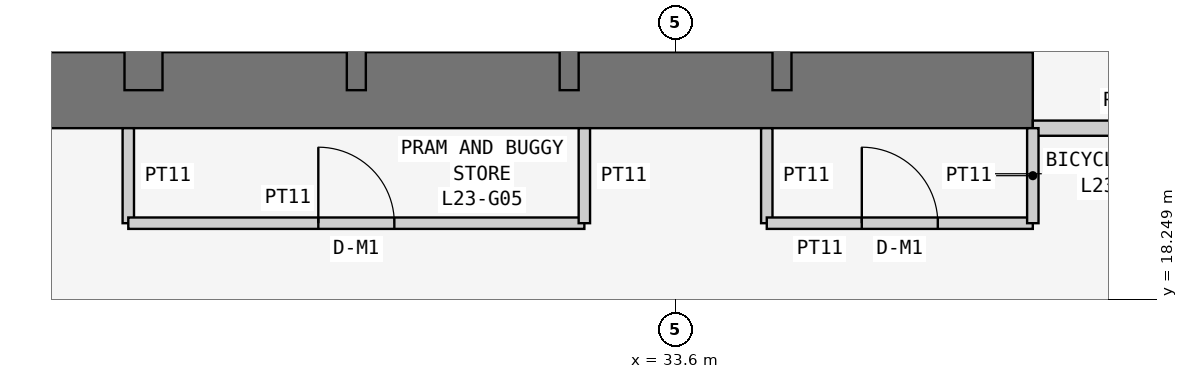
"""IFC4 building model, lengths in metres.
Left out: names, types, materials, properties, quantities, classifications, styles, units other than length and angle.
Written with IfcOpenShell. Run it as: python <this file> out.ifc"""

import sys

from ifc_helpers import new_model, si_unit, direction, frame, frame_2d, origin, place, context, subcontext, project, spatial, rectangle, extrude, element, fill, save


model = new_model("IFC4")
c1 = context("Model", 3, precision=1e-05, world=origin(), true_north=direction((0.0, 1.0)))
c2 = subcontext(c1, "Body", "Model", "MODEL_VIEW")
j1 = project(units=[si_unit("LENGTHUNIT", "METRE"), si_unit("PLANEANGLEUNIT", "RADIAN")], contexts=[c1])
p1 = place(None, origin())
s1 = spatial("IfcSite", under=j1, at=p1, CompositionType="ELEMENT")
p2 = place(p1, origin())
s2 = spatial("IfcBuilding", under=s1, at=p2, CompositionType="ELEMENT")
p3 = place(p2, frame((0.0, 0.0, 92.1)))
s3 = spatial("IfcBuildingStorey", under=s2, at=p3, CompositionType="ELEMENT", Elevation=92.1)
p4 = place(p3, frame((21.0, 21.0, 0.0), z_axis=(0.0, 0.0, 1.0), x_axis=(1.0, 0.0, 0.0)))
e1 = element("IfcWall", 1, at=p4, inside=s3, PredefinedType="SHEAR", context=c2, shape_type="SweptSolid", body=[
    extrude(rectangle(XDim=17.3, YDim=1.0, at=frame_2d((8.65, 0.0))), origin(), (0.0, 0.0, 1.0), 3.6),
])
p5 = place(p3, frame((37.8, 21.0, 0.0), z_axis=(0.0, 0.0, 1.0), x_axis=(0.0, 1.0, 0.0)))
e2 = element("IfcWall", 2, at=p5, inside=s3, PredefinedType="SHEAR", context=c2, shape_type="SweptSolid", body=[
    extrude(rectangle(XDim=17.3, YDim=1.0, at=frame_2d((8.65, 0.0))), origin(), (0.0, 0.0, 1.0), 3.6),
])
p6 = place(p5, frame((5.2, 0.0, 0.0)))
e3 = element("IfcOpeningElement", 3, at=p6, cuts=e2, PredefinedType="OPENING", context=c2, shape_type="SweptSolid", body=[
    extrude(rectangle(XDim=1.2, YDim=2.1, at=frame_2d((0.6, 1.05))), frame((0.0, 0.51, 0.0), z_axis=(0.0, -1.0, 0.0), x_axis=(1.0, 0.0, 0.0)), (0.0, 0.0, 1.0), 1.02),
])
p7 = place(p3, frame((26.6, 21.0, 0.0), z_axis=(0.0, 0.0, 1.0), x_axis=(0.0, 1.0, 0.0)))
e4 = element("IfcWall", 4, at=p7, inside=s3, PredefinedType="SHEAR", context=c2, shape_type="SweptSolid", body=[
    extrude(rectangle(XDim=16.8, YDim=0.5, at=frame_2d((8.4, 0.0))), origin(), (0.0, 0.0, 1.0), 3.6),
])
p8 = place(p7, frame((10.4, 0.0, 0.0)))
e5 = element("IfcOpeningElement", 5, at=p8, cuts=e4, PredefinedType="OPENING", context=c2, shape_type="SweptSolid", body=[
    extrude(rectangle(XDim=1.2, YDim=2.1, at=frame_2d((0.6, 1.05))), frame((0.0, 0.26, 0.0), z_axis=(0.0, -1.0, 0.0), x_axis=(1.0, 0.0, 0.0)), (0.0, 0.0, 1.0), 0.52),
])
for number, where, z_axis, x_axis in (
    (6, (29.4, 21.0, 0.0), (0.0, 0.0, 1.0), (0.0, 1.0, 0.0)),
    (7, (32.2, 21.0, 0.0), (0.0, 0.0, 1.0), (0.0, 1.0, 0.0)),
    (8, (35.0, 21.0, 0.0), (0.0, 0.0, 1.0), (0.0, 1.0, 0.0)),
):
    element("IfcWall", number, at=place(p3, frame(where, z_axis=z_axis, x_axis=x_axis)), inside=s3, PredefinedType="SHEAR", context=c2, shape_type="SweptSolid", body=[
        extrude(rectangle(XDim=3.2, YDim=0.25, at=frame_2d((1.6, 0.0))), origin(), (0.0, 0.0, 1.0), 3.6),
    ])
p9 = place(p3, frame((38.3, 20.5, 0.0), z_axis=(0.0, 0.0, 1.0), x_axis=(1.0, 0.0, 0.0)))
e9 = element("IfcWall", 9, at=p9, inside=s3, PredefinedType="PARTITIONING", context=c2, shape_type="SweptSolid", body=[
    extrude(rectangle(XDim=2.3, YDim=0.2, at=frame_2d((1.15, 0.0))), origin(), (0.0, 0.0, 1.0), 3.45),
])
p10 = place(p3, frame((26.4, 20.5, 0.0), z_axis=(0.0, 0.0, 1.0), x_axis=(0.0, -1.0, 0.0)))
e10 = element("IfcWall", 10, at=p10, inside=s3, PredefinedType="PARTITIONING", context=c2, shape_type="SweptSolid", body=[
    extrude(rectangle(XDim=1.25, YDim=0.15, at=frame_2d((0.625, 0.0))), origin(), (0.0, 0.0, 1.0), 3.45),
])
p11 = place(p3, frame((26.4, 19.25, 0.0), z_axis=(0.0, 0.0, 1.0), x_axis=(1.0, 0.0, 0.0)))
e11 = element("IfcWall", 11, at=p11, inside=s3, PredefinedType="PARTITIONING", context=c2, shape_type="SweptSolid", body=[
    extrude(rectangle(XDim=6.0, YDim=0.15, at=frame_2d((3.0, 0.0))), origin(), (0.0, 0.0, 1.0), 3.45),
])
p12 = place(p11, frame((2.5, 0.0, 0.0)))
e12 = element("IfcOpeningElement", 12, at=p12, cuts=e11, PredefinedType="OPENING", context=c2, shape_type="SweptSolid", body=[
    extrude(rectangle(XDim=1.0, YDim=2.1, at=frame_2d((0.5, 1.05))), frame((0.0, 0.085, 0.0), z_axis=(0.0, -1.0, 0.0), x_axis=(1.0, 0.0, 0.0)), (0.0, 0.0, 1.0), 0.17),
])
for number, where, z_axis, x_axis in (
    (13, (32.4, 19.25, 0.0), (0.0, 0.0, 1.0), (0.0, 1.0, 0.0)),
    (14, (34.8, 20.5, 0.0), (0.0, 0.0, 1.0), (0.0, -1.0, 0.0)),
):
    element("IfcWall", number, at=place(p3, frame(where, z_axis=z_axis, x_axis=x_axis)), inside=s3, PredefinedType="PARTITIONING", context=c2, shape_type="SweptSolid", body=[
        extrude(rectangle(XDim=1.25, YDim=0.15, at=frame_2d((0.625, 0.0))), origin(), (0.0, 0.0, 1.0), 3.45),
    ])
p13 = place(p3, frame((34.8, 19.25, 0.0), z_axis=(0.0, 0.0, 1.0), x_axis=(1.0, 0.0, 0.0)))
e15 = element("IfcWall", 15, at=p13, inside=s3, PredefinedType="PARTITIONING", context=c2, shape_type="SweptSolid", body=[
    extrude(rectangle(XDim=3.5, YDim=0.15, at=frame_2d((1.75, 0.0))), origin(), (0.0, 0.0, 1.0), 3.45),
])
p14 = place(p13, frame((1.25, 0.0, 0.0)))
e16 = element("IfcOpeningElement", 16, at=p14, cuts=e15, PredefinedType="OPENING", context=c2, shape_type="SweptSolid", body=[
    extrude(rectangle(XDim=1.0, YDim=2.1, at=frame_2d((0.5, 1.05))), frame((0.0, 0.085, 0.0), z_axis=(0.0, -1.0, 0.0), x_axis=(1.0, 0.0, 0.0)), (0.0, 0.0, 1.0), 0.17),
])
p15 = place(p3, frame((38.3, 19.25, 0.0), z_axis=(0.0, 0.0, 1.0), x_axis=(0.0, 1.0, 0.0)))
e17 = element("IfcWall", 17, at=p15, inside=s3, PredefinedType="PARTITIONING", context=c2, shape_type="SweptSolid", body=[
    extrude(rectangle(XDim=1.25, YDim=0.15, at=frame_2d((0.625, 0.0))), origin(), (0.0, 0.0, 1.0), 3.45),
])
p16 = place(p12, origin())
e18 = element("IfcDoor", 18, at=p16, inside=s3, OperationType="SINGLE_SWING_LEFT", PredefinedType="DOOR", context=c2, shape_type="SweptSolid", body=[
    extrude(rectangle(XDim=1.0, YDim=2.1, at=frame_2d((0.5, 1.05))), frame((0.0, 0.025, 0.0), z_axis=(0.0, -1.0, 0.0), x_axis=(1.0, 0.0, 0.0)), (0.0, 0.0, 1.0), 0.05),
])
fill(e12, e18)
p17 = place(p14, origin())
e19 = element("IfcDoor", 19, at=p17, inside=s3, OperationType="SINGLE_SWING_LEFT", PredefinedType="DOOR", context=c2, shape_type="SweptSolid", body=[
    extrude(rectangle(XDim=1.0, YDim=2.1, at=frame_2d((0.5, 1.05))), frame((0.0, 0.025, 0.0), z_axis=(0.0, -1.0, 0.0), x_axis=(1.0, 0.0, 0.0)), (0.0, 0.0, 1.0), 0.05),
])
fill(e16, e19)
save(model, sys.argv[1])
